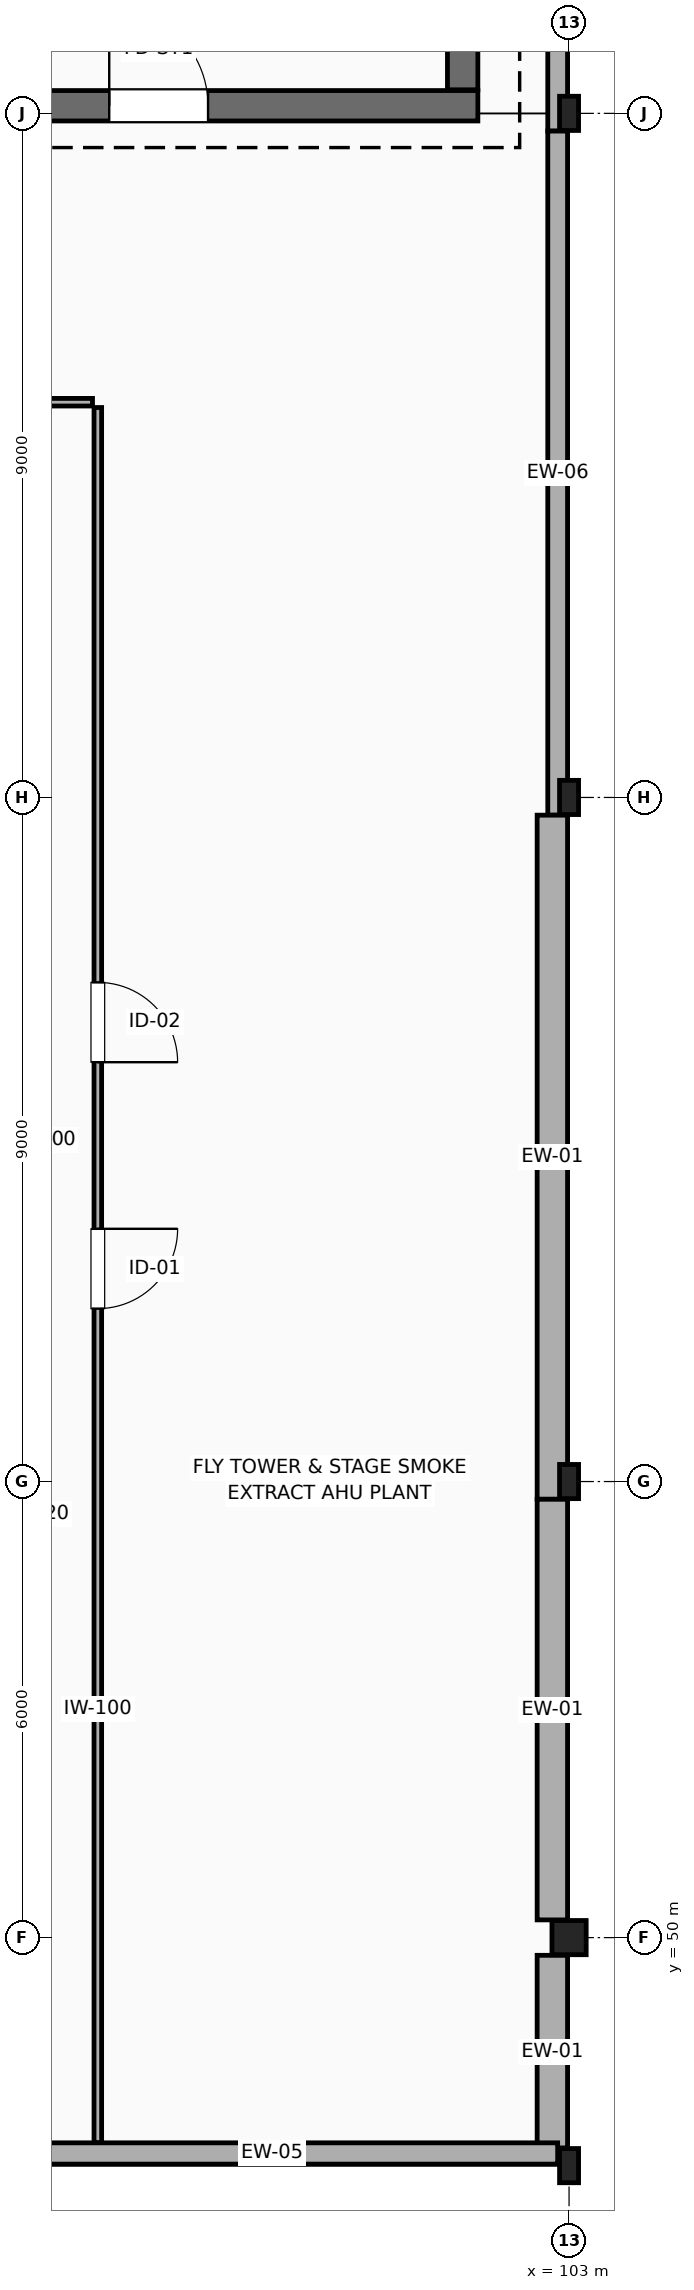
"""IFC4 building model, lengths in metres.
Left out: names, types, materials, properties, quantities, classifications, styles, units other than length and angle.
Written with IfcOpenShell. Run it as: python <this file> out.ifc"""

import sys

from ifc_helpers import new_model, si_unit, direction, frame, frame_2d, origin, origin_2d, place, context, subcontext, project, spatial, rectangle, hollow_rectangle, i_section, extrude, element, fill, save


model = new_model("IFC4")
c1 = context("Model", 3, precision=1e-05, world=origin(), true_north=direction((0.0, 1.0)))
c2 = subcontext(c1, "Body", "Model", "MODEL_VIEW")
j1 = project(units=[si_unit("LENGTHUNIT", "METRE"), si_unit("PLANEANGLEUNIT", "RADIAN")], contexts=[c1])
p1 = place(None, origin())
s1 = spatial("IfcSite", under=j1, at=p1, CompositionType="ELEMENT")
p2 = place(p1, origin())
s2 = spatial("IfcBuilding", under=s1, at=p2, CompositionType="ELEMENT")
p3 = place(p2, frame((0.0, 0.0, 24.3)))
s3 = spatial("IfcBuildingStorey", under=s2, at=p3, CompositionType="ELEMENT", Elevation=24.3)
p4 = place(p3, frame((103.0, 50.0, 0.0), z_axis=(0.0, 0.0, 1.0), x_axis=(1.0, 0.0, 0.0)))
e1 = element("IfcColumn", 1, at=p4, inside=s3, PredefinedType="COLUMN", context=c2, shape_type="SweptSolid", body=[
    extrude(hollow_rectangle(XDim=0.45, YDim=0.45, WallThickness=0.02, at=origin_2d()), origin(), (0.0, 0.0, 1.0), 4.5),
])
for number, where, z_axis, x_axis in (
    (2, (103.0, 56.0, 0.0), (0.0, 0.0, 1.0), (1.0, 0.0, 0.0)),
    (3, (103.0, 65.0, 0.0), (0.0, 0.0, 1.0), (1.0, 0.0, 0.0)),
    (4, (103.0, 74.0, 0.0), (0.0, 0.0, 1.0), (1.0, 0.0, 0.0)),
    (5, (103.0, 47.0, 0.0), (0.0, 0.0, 1.0), (1.0, 0.0, 0.0)),
):
    element("IfcColumn", number, at=place(p3, frame(where, z_axis=z_axis, x_axis=x_axis)), inside=s3, PredefinedType="COLUMN", context=c2, shape_type="SweptSolid", body=[
        extrude(i_section(OverallWidth=0.25, OverallDepth=0.45, WebThickness=0.011, FlangeThickness=0.014, FilletRadius=0.015, at=origin_2d()), origin(), (0.0, 0.0, 1.0), 4.5),
    ])
for number, where, z_axis, x_axis in (
    (6, (102.85, 82.767, 0.0), (0.0, 0.0, 1.0), (0.0, -1.0, 0.0)),
    (7, (102.85, 73.767, 0.0), (0.0, 0.0, 1.0), (0.0, -1.0, 0.0)),
):
    element("IfcWall", number, at=place(p3, frame(where, z_axis=z_axis, x_axis=x_axis)), inside=s3, PredefinedType="ELEMENTEDWALL", context=c2, shape_type="SweptSolid", body=[
        extrude(rectangle(XDim=9.0, YDim=0.26, at=frame_2d((4.5, 0.0))), origin(), (0.0, 0.0, 1.0), 4.5),
    ])
p5 = place(p3, frame((102.78, 64.767, 0.0), z_axis=(0.0, 0.0, 1.0), x_axis=(0.0, -1.0, 0.0)))
e8 = element("IfcWall", 8, at=p5, inside=s3, PredefinedType="STANDARD", context=c2, shape_type="SweptSolid", body=[
    extrude(rectangle(XDim=9.0, YDim=0.4, at=frame_2d((4.5, 0.0))), origin(), (0.0, 0.0, 1.0), 4.5),
])
p6 = place(p3, frame((102.78, 55.767, 0.0), z_axis=(0.0, 0.0, 1.0), x_axis=(0.0, -1.0, 0.0)))
e9 = element("IfcWall", 9, at=p6, inside=s3, PredefinedType="STANDARD", context=c2, shape_type="SweptSolid", body=[
    extrude(rectangle(XDim=5.534, YDim=0.4, at=frame_2d((2.767, 0.0))), origin(), (0.0, 0.0, 1.0), 4.5),
])
p7 = place(p3, frame((102.78, 49.767, 0.0), z_axis=(0.0, 0.0, 1.0), x_axis=(0.0, -1.0, 0.0)))
e10 = element("IfcWall", 10, at=p7, inside=s3, PredefinedType="STANDARD", context=c2, shape_type="SweptSolid", body=[
    extrude(rectangle(XDim=2.534, YDim=0.4, at=frame_2d((1.267, 0.0))), origin(), (0.0, 0.0, 1.0), 4.5),
])
p8 = place(p3, frame((102.85, 47.16, 0.0), z_axis=(0.0, 0.0, 1.0), x_axis=(-1.0, 0.0, 0.0)))
e11 = element("IfcWall", 11, at=p8, inside=s3, PredefinedType="STANDARD", context=c2, shape_type="SweptSolid", body=[
    extrude(rectangle(XDim=7.517, YDim=0.28, at=frame_2d((3.759, 0.0))), origin(), (0.0, 0.0, 1.0), 1.893),
])
p9 = place(p3, frame((93.4, 74.1, 0.0), z_axis=(0.0, 0.0, 1.0), x_axis=(1.0, 0.0, 0.0)))
e12 = element("IfcWall", 12, at=p9, inside=s3, PredefinedType="SHEAR", context=c2, shape_type="SweptSolid", body=[
    extrude(rectangle(XDim=8.4, YDim=0.4, at=frame_2d((4.2, 0.0))), origin(), (0.0, 0.0, 1.0), 4.28),
])
p10 = place(p9, frame((3.55, 0.0, 0.0)))
e13 = element("IfcOpeningElement", 13, at=p10, cuts=e12, PredefinedType="OPENING", context=c2, shape_type="SweptSolid", body=[
    extrude(rectangle(XDim=1.3, YDim=2.15, at=frame_2d((0.65, 1.075))), frame((0.0, 0.21, 0.0), z_axis=(0.0, -1.0, 0.0), x_axis=(1.0, 0.0, 0.0)), (0.0, 0.0, 1.0), 0.42),
])
p11 = place(p3, frame((101.6, 74.31, 0.0), z_axis=(0.0, 0.0, 1.0), x_axis=(0.0, 1.0, 0.0)))
e14 = element("IfcWall", 14, at=p11, inside=s3, PredefinedType="SHEAR", context=c2, shape_type="SweptSolid", body=[
    extrude(rectangle(XDim=8.38, YDim=0.4, at=frame_2d((4.19, 0.0))), origin(), (0.0, 0.0, 1.0), 4.28),
])
p12 = place(p3, frame((64.27, 70.2, 0.0), z_axis=(0.0, 0.0, 1.0), x_axis=(1.0, 0.0, 0.0)))
e15 = element("IfcWall", 15, at=p12, inside=s3, PredefinedType="PARTITIONING", context=c2, shape_type="SweptSolid", body=[
    extrude(rectangle(XDim=32.46, YDim=0.1, at=frame_2d((16.23, 0.0))), origin(), (0.0, 0.0, 1.0), 4.5),
])
p13 = place(p12, frame((15.755, 0.0, 0.0)))
e16 = element("IfcOpeningElement", 16, at=p13, cuts=e15, PredefinedType="OPENING", context=c2, shape_type="SweptSolid", body=[
    extrude(rectangle(XDim=0.95, YDim=2.15, at=frame_2d((0.475, 1.075))), frame((0.0, 0.06, 0.0), z_axis=(0.0, -1.0, 0.0), x_axis=(1.0, 0.0, 0.0)), (0.0, 0.0, 1.0), 0.12),
])
p14 = place(p3, frame((96.8, 70.13, 0.0), z_axis=(0.0, 0.0, 1.0), x_axis=(0.0, -1.0, 0.0)))
e17 = element("IfcWall", 17, at=p14, inside=s3, PredefinedType="PARTITIONING", context=c2, shape_type="SweptSolid", body=[
    extrude(rectangle(XDim=22.826, YDim=0.1, at=frame_2d((11.413, 0.0))), origin(), (0.0, 0.0, 1.0), 4.5),
])
p15 = place(p14, frame((10.805, 0.0, 0.0)))
e18 = element("IfcOpeningElement", 18, at=p15, cuts=e17, PredefinedType="OPENING", context=c2, shape_type="SweptSolid", body=[
    extrude(rectangle(XDim=1.05, YDim=2.15, at=frame_2d((0.525, 1.075))), frame((0.0, 0.06, 0.0), z_axis=(0.0, -1.0, 0.0), x_axis=(1.0, 0.0, 0.0)), (0.0, 0.0, 1.0), 0.12),
])
p16 = place(p14, frame((7.563, 0.0, 0.0)))
e19 = element("IfcOpeningElement", 19, at=p16, cuts=e17, PredefinedType="OPENING", context=c2, shape_type="SweptSolid", body=[
    extrude(rectangle(XDim=1.05, YDim=2.15, at=frame_2d((0.525, 1.075))), frame((0.0, 0.06, 0.0), z_axis=(0.0, -1.0, 0.0), x_axis=(1.0, 0.0, 0.0)), (0.0, 0.0, 1.0), 0.12),
])
p17 = place(p10, origin())
e20 = element("IfcDoor", 20, at=p17, inside=s3, OperationType="SINGLE_SWING_LEFT", PredefinedType="DOOR", context=c2, shape_type="SweptSolid", body=[
    extrude(rectangle(XDim=1.3, YDim=2.15, at=frame_2d((0.65, 1.075))), frame((0.0, 0.025, 0.0), z_axis=(0.0, -1.0, 0.0), x_axis=(1.0, 0.0, 0.0)), (0.0, 0.0, 1.0), 0.05),
])
fill(e13, e20)
p18 = place(p15, origin())
e21 = element("IfcDoor", 21, at=p18, inside=s3, OperationType="SINGLE_SWING_LEFT", PredefinedType="DOOR", context=c2, shape_type="SweptSolid", body=[
    extrude(rectangle(XDim=1.05, YDim=2.15, at=frame_2d((0.525, 1.075))), frame((0.0, 0.025, 0.0), z_axis=(0.0, -1.0, 0.0), x_axis=(1.0, 0.0, 0.0)), (0.0, 0.0, 1.0), 0.05),
])
fill(e18, e21)
p19 = place(p16, origin())
e22 = element("IfcDoor", 22, at=p19, inside=s3, OperationType="SINGLE_SWING_RIGHT", PredefinedType="DOOR", context=c2, shape_type="SweptSolid", body=[
    extrude(rectangle(XDim=1.05, YDim=2.15, at=frame_2d((0.525, 1.075))), frame((0.0, 0.025, 0.0), z_axis=(0.0, -1.0, 0.0), x_axis=(1.0, 0.0, 0.0)), (0.0, 0.0, 1.0), 0.05),
])
fill(e19, e22)
save(model, sys.argv[1])
